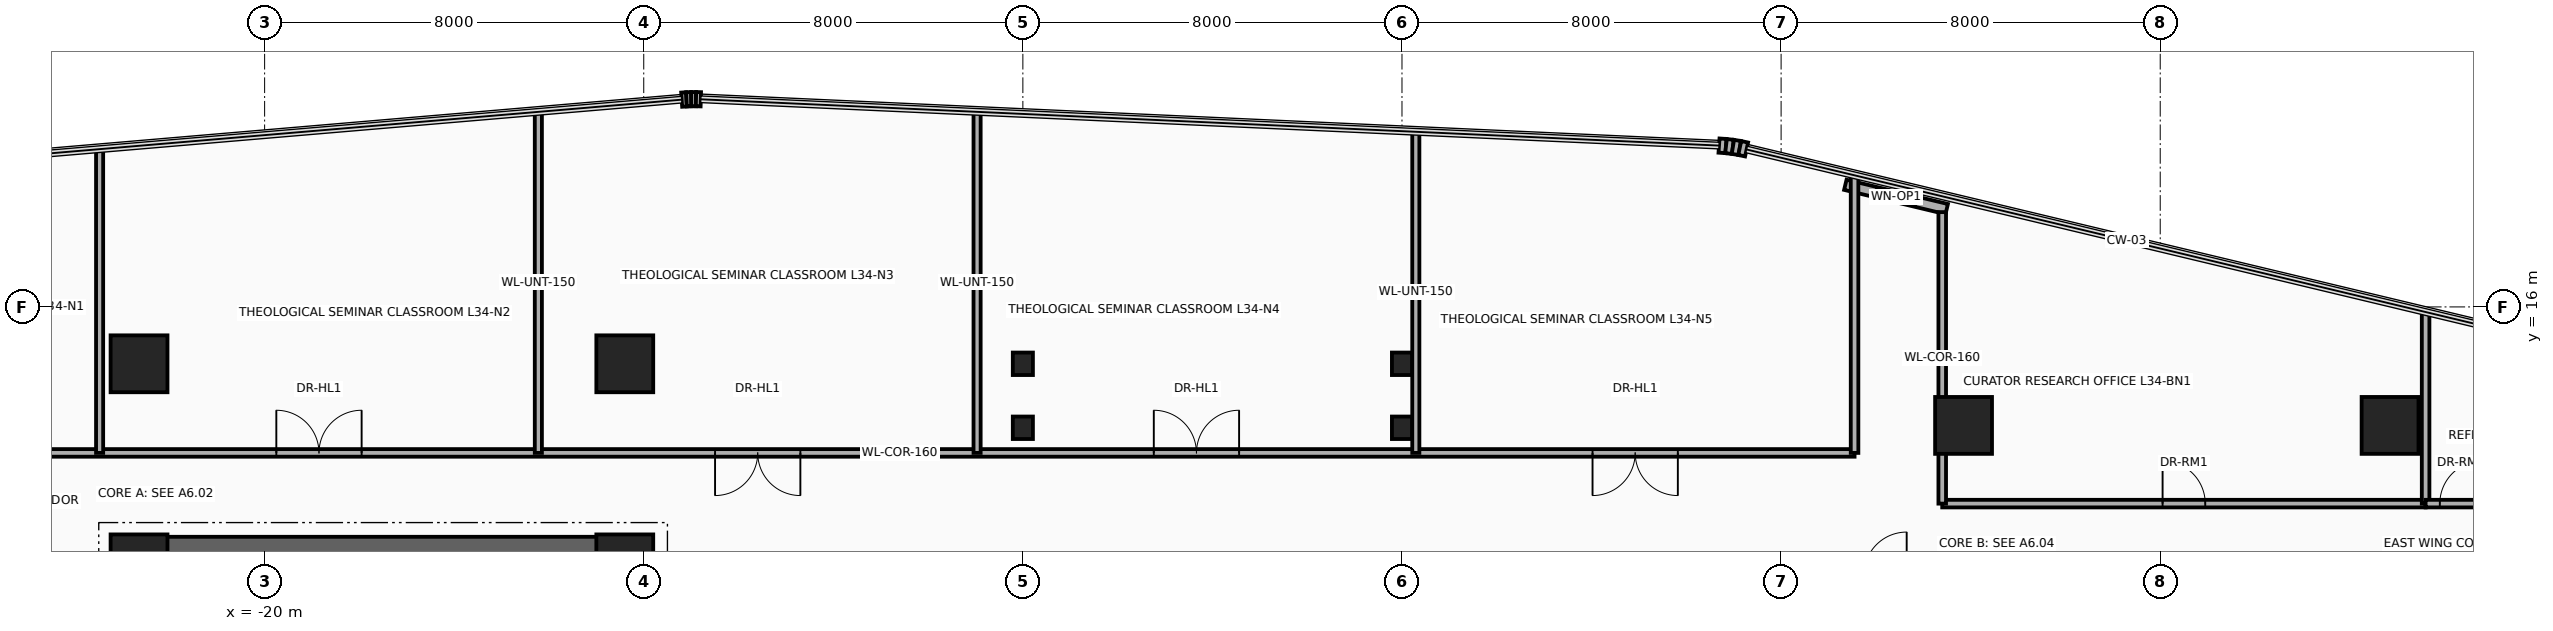
"""IFC4 building model, lengths in metres.
Left out: names, types, materials, properties, quantities, classifications, styles, units other than length and angle.
Written with IfcOpenShell. Run it as: python <this file> out.ifc"""

import sys

from ifc_helpers import new_model, si_unit, direction, frame, frame_2d, origin, origin_2d, place, context, subcontext, project, spatial, rectangle, i_section, extrude, source, transform, mapped, element, fill, save


model = new_model("IFC4")
c1 = context("Model", 3, precision=1e-05, world=origin(), true_north=direction((0.0, 1.0)))
c2 = subcontext(c1, "Body", "Model", "MODEL_VIEW")
j1 = project(units=[si_unit("LENGTHUNIT", "METRE"), si_unit("PLANEANGLEUNIT", "RADIAN")], contexts=[c1])
p1 = place(None, origin())
s1 = spatial("IfcSite", under=j1, at=p1, CompositionType="ELEMENT")
p2 = place(p1, origin())
s2 = spatial("IfcBuilding", under=s1, at=p2, CompositionType="ELEMENT")
p3 = place(p2, frame((0.0, 0.0, 135.3)))
s3 = spatial("IfcBuildingStorey", under=s2, at=p3, CompositionType="ELEMENT", Elevation=135.3)
p4 = place(p3, frame((-22.65, -11.15, 0.0), z_axis=(0.0, 0.0, 1.0), x_axis=(0.0, 1.0, 0.0)))
e1 = element("IfcWall", 1, at=p4, inside=s3, PredefinedType="SHEAR", context=c2, shape_type="SweptSolid", body=[
    extrude(rectangle(XDim=22.3, YDim=0.7, at=frame_2d((11.15, 0.0))), origin(), (0.0, 0.0, 1.0), 3.46),
])
p5 = place(p3, frame((-22.65, 10.8, 0.0), z_axis=(0.0, 0.0, 1.0), x_axis=(1.0, 0.0, 0.0)))
e2 = element("IfcWall", 2, at=p5, inside=s3, PredefinedType="SHEAR", context=c2, shape_type="SweptSolid", body=[
    extrude(rectangle(XDim=10.25, YDim=0.7, at=frame_2d((5.125, 0.0))), origin(), (0.0, 0.0, 1.0), 3.46),
])
m1 = source(origin(), c2, "Body", "SweptSolid", [
    extrude(rectangle(XDim=1.2, YDim=1.2, at=origin_2d()), origin(), (0.0, 0.0, 1.0), 3.7),
])
for number, where, z_axis, x_axis in (
    (3, (-22.65, 10.6, 0.0), (0.0, 0.0, 1.0), (1.0, 0.0, 0.0)),
    (4, (-12.4, 10.6, 0.0), (0.0, 0.0, 1.0), (1.0, 0.0, 0.0)),
    (5, (-22.65, 14.8, 0.0), (0.0, 0.0, 1.0), (1.0, 0.0, 0.0)),
    (6, (-12.4, 14.8, 0.0), (0.0, 0.0, 1.0), (1.0, 0.0, 0.0)),
    (7, (15.85, 13.5, 0.0), (0.0, 0.0, 1.0), (1.0, 0.0, 0.0)),
    (8, (24.85, 13.5, 0.0), (0.0, 0.0, 1.0), (1.0, 0.0, 0.0)),
):
    element("IfcColumn", number, at=place(p3, frame(where, z_axis=z_axis, x_axis=x_axis)), inside=s3, PredefinedType="COLUMN", context=c2, shape_type="MappedRepresentation", body=[
        mapped(m1, transform((0.0, 0.0, 0.0), x_axis=(1.0, 0.0, 0.0), y_axis=(0.0, 1.0, 0.0), z_axis=(0.0, 0.0, 1.0), scale=1.0)),
    ])
m2 = source(origin(), c2, "Body", "SweptSolid", [
    extrude(i_section(OverallWidth=0.424, OverallDepth=0.474, WebThickness=0.048, FlangeThickness=0.077, at=origin_2d()), origin(), (0.0, 0.0, 1.0), 3.7),
])
for number, where, z_axis, x_axis in (
    (9, (-4.0, 13.45, 0.0), (0.0, 0.0, 1.0), (1.0, 0.0, 0.0)),
    (10, (-4.0, 14.8, 0.0), (0.0, 0.0, 1.0), (1.0, 0.0, 0.0)),
    (11, (4.0, 13.45, 0.0), (0.0, 0.0, 1.0), (1.0, 0.0, 0.0)),
    (12, (4.0, 14.8, 0.0), (0.0, 0.0, 1.0), (1.0, 0.0, 0.0)),
):
    element("IfcColumn", number, at=place(p3, frame(where, z_axis=z_axis, x_axis=x_axis)), inside=s3, PredefinedType="COLUMN", context=c2, shape_type="MappedRepresentation", body=[
        mapped(m2, transform((0.0, 0.0, 0.0), x_axis=(1.0, 0.0, 0.0), y_axis=(0.0, 1.0, 0.0), z_axis=(0.0, 0.0, 1.0), scale=1.0)),
    ])
p6 = place(p3, frame((-11.199, 20.373, 0.0), z_axis=(0.0, 0.0, 1.0), x_axis=(0.997567332166, 0.069709524416, 0.0)))
e13 = element("IfcWall", 13, at=p6, inside=s3, PredefinedType="SOLIDWALL", context=c2, shape_type="SweptSolid", body=[
    extrude(rectangle(XDim=0.102, YDim=0.3, at=frame_2d((0.051, 0.0))), origin(), (0.0, 0.0, 1.0), 3.46),
])
p7 = place(p3, frame((-11.098, 20.38, 0.0), z_axis=(0.0, 0.0, 1.0), x_axis=(0.999334672785, 0.03647206835, 0.0)))
e14 = element("IfcWall", 14, at=p7, inside=s3, PredefinedType="SOLIDWALL", context=c2, shape_type="SweptSolid", body=[
    extrude(rectangle(XDim=0.1, YDim=0.3, at=frame_2d((0.05, 0.0))), origin(), (0.0, 0.0, 1.0), 3.46),
])
p8 = place(p3, frame((-10.998, 20.383, 0.0), z_axis=(0.0, 0.0, 1.0), x_axis=(0.999997054401, 0.002427177317, 0.0)))
e15 = element("IfcWall", 15, at=p8, inside=s3, PredefinedType="SOLIDWALL", context=c2, shape_type="SweptSolid", body=[
    extrude(rectangle(XDim=0.101, YDim=0.3, at=frame_2d((0.05, 0.0))), origin(), (0.0, 0.0, 1.0), 3.46),
])
p9 = place(p3, frame((-10.897, 20.384, 0.0), z_axis=(0.0, 0.0, 1.0), x_axis=(0.999584209171, -0.02883415988, 0.0)))
e16 = element("IfcWall", 16, at=p9, inside=s3, PredefinedType="SOLIDWALL", context=c2, shape_type="SweptSolid", body=[
    extrude(rectangle(XDim=0.102, YDim=0.3, at=frame_2d((0.051, 0.0))), origin(), (0.0, 0.0, 1.0), 3.46),
])
p10 = place(p3, frame((10.69, 19.404, 0.0), z_axis=(0.0, 0.0, 1.0), x_axis=(0.99758310784, -0.069483400546, 0.0)))
e17 = element("IfcWall", 17, at=p10, inside=s3, PredefinedType="SOLIDWALL", context=c2, shape_type="SweptSolid", body=[
    extrude(rectangle(XDim=0.147, YDim=0.3, at=frame_2d((0.074, 0.0))), origin(), (0.0, 0.0, 1.0), 3.46),
])
for number, where, z_axis, x_axis in (
    (18, (10.837, 19.394, 0.0), (0.0, 0.0, 1.0), (0.993, -0.117, 0.0)),
    (19, (10.983, 19.377, 0.0), (0.0, 0.0, 1.0), (0.987, -0.163, 0.0)),
):
    element("IfcWall", number, at=place(p3, frame(where, z_axis=z_axis, x_axis=x_axis)), inside=s3, PredefinedType="SOLIDWALL", context=c2, shape_type="SweptSolid", body=[
        extrude(rectangle(XDim=0.146, YDim=0.3, at=frame_2d((0.073, 0.0))), origin(), (0.0, 0.0, 1.0), 3.46),
    ])
p11 = place(p3, frame((11.127, 19.353, 0.0), z_axis=(0.0, 0.0, 1.0), x_axis=(0.978019841688, -0.208511844421, 0.0)))
e20 = element("IfcWall", 20, at=p11, inside=s3, PredefinedType="SOLIDWALL", context=c2, shape_type="SweptSolid", body=[
    extrude(rectangle(XDim=0.147, YDim=0.3, at=frame_2d((0.074, 0.0))), origin(), (0.0, 0.0, 1.0), 3.46),
])
p12 = place(p3, frame((13.355, 18.576, 0.0), z_axis=(0.0, 0.0, 1.0), x_axis=(0.97252211384, -0.232810519721, 0.0)))
e21 = element("IfcWall", 21, at=p12, inside=s3, PredefinedType="SOLIDWALL", context=c2, shape_type="SweptSolid", body=[
    extrude(rectangle(XDim=2.2, YDim=0.22, at=frame_2d((1.1, 0.0))), origin(), (0.0, 0.0, 1.0), 3.46),
])
p13 = place(p12, frame((0.65, 0.0, 0.95)))
e22 = element("IfcOpeningElement", 22, at=p13, cuts=e21, PredefinedType="OPENING", context=c2, shape_type="SweptSolid", body=[
    extrude(rectangle(XDim=0.9, YDim=1.3, at=frame_2d((0.45, 0.65))), frame((0.0, 0.125, 0.0), z_axis=(0.0, -1.0, 0.0), x_axis=(1.0, 0.0, 0.0)), (0.0, 0.0, 1.0), 0.25),
])
p14 = place(p3, frame((-28.25, 12.92, 0.0), z_axis=(0.0, 0.0, 1.0), x_axis=(1.0, 0.0, 0.0)))
e23 = element("IfcWall", 23, at=p14, inside=s3, PredefinedType="PARTITIONING", context=c2, shape_type="SweptSolid", body=[
    extrude(rectangle(XDim=41.8, YDim=0.16, at=frame_2d((20.9, 0.0))), origin(), (0.0, 0.0, 1.0), 2.666),
])
p15 = place(p14, frame((1.934, 0.0, 0.0)))
e24 = element("IfcOpeningElement", 24, at=p15, cuts=e23, PredefinedType="OPENING", context=c2, shape_type="SweptSolid", body=[
    extrude(rectangle(XDim=0.9, YDim=2.1, at=frame_2d((0.45, 1.05))), frame((0.0, 0.095, 0.0), z_axis=(0.0, -1.0, 0.0), x_axis=(1.0, 0.0, 0.0)), (0.0, 0.0, 1.0), 0.19),
])
p16 = place(p14, frame((8.497, 0.0, 0.0)))
e25 = element("IfcOpeningElement", 25, at=p16, cuts=e23, PredefinedType="OPENING", context=c2, shape_type="SweptSolid", body=[
    extrude(rectangle(XDim=1.8, YDim=2.15, at=frame_2d((0.9, 1.075))), frame((0.0, 0.095, 0.0), z_axis=(0.0, -1.0, 0.0), x_axis=(1.0, 0.0, 0.0)), (0.0, 0.0, 1.0), 0.19),
])
p17 = place(p14, frame((17.755, 0.0, 0.0)))
e26 = element("IfcOpeningElement", 26, at=p17, cuts=e23, PredefinedType="OPENING", context=c2, shape_type="SweptSolid", body=[
    extrude(rectangle(XDim=1.8, YDim=2.15, at=frame_2d((0.9, 1.075))), frame((0.0, 0.095, 0.0), z_axis=(0.0, -1.0, 0.0), x_axis=(1.0, 0.0, 0.0)), (0.0, 0.0, 1.0), 0.19),
])
p18 = place(p14, frame((27.013, 0.0, 0.0)))
e27 = element("IfcOpeningElement", 27, at=p18, cuts=e23, PredefinedType="OPENING", context=c2, shape_type="SweptSolid", body=[
    extrude(rectangle(XDim=1.8, YDim=2.15, at=frame_2d((0.9, 1.075))), frame((0.0, 0.095, 0.0), z_axis=(0.0, -1.0, 0.0), x_axis=(1.0, 0.0, 0.0)), (0.0, 0.0, 1.0), 0.19),
])
p19 = place(p14, frame((36.271, 0.0, 0.0)))
e28 = element("IfcOpeningElement", 28, at=p19, cuts=e23, PredefinedType="OPENING", context=c2, shape_type="SweptSolid", body=[
    extrude(rectangle(XDim=1.8, YDim=2.15, at=frame_2d((0.9, 1.075))), frame((0.0, 0.095, 0.0), z_axis=(0.0, -1.0, 0.0), x_axis=(1.0, 0.0, 0.0)), (0.0, 0.0, 1.0), 0.19),
])
p20 = place(p3, frame((13.55, 12.92, 0.0), z_axis=(0.0, 0.0, 1.0), x_axis=(0.0, 1.0, 0.0)))
e29 = element("IfcWall", 29, at=p20, inside=s3, PredefinedType="PARTITIONING", context=c2, shape_type="SweptSolid", body=[
    extrude(rectangle(XDim=5.857, YDim=0.16, at=frame_2d((2.928, 0.0))), origin(), (0.0, 0.0, 1.0), 2.666),
])
p21 = place(p3, frame((-23.482, 12.92, 0.0), z_axis=(0.0, 0.0, 1.0), x_axis=(0.0, 1.0, 0.0)))
e30 = element("IfcWall", 30, at=p21, inside=s3, PredefinedType="PARTITIONING", context=c2, shape_type="SweptSolid", body=[
    extrude(rectangle(XDim=6.409, YDim=0.15, at=frame_2d((3.204, 0.0))), origin(), (0.0, 0.0, 1.0), 2.666),
])
for number, where, z_axis, x_axis in (
    (31, (-14.224, 12.92, 0.0), (0.0, 0.0, 1.0), (0.0, 1.0, 0.0)),
    (32, (-4.966, 12.92, 0.0), (0.0, 0.0, 1.0), (0.0, 1.0, 0.0)),
):
    element("IfcWall", number, at=place(p3, frame(where, z_axis=z_axis, x_axis=x_axis)), inside=s3, PredefinedType="PARTITIONING", context=c2, shape_type="SweptSolid", body=[
        extrude(rectangle(XDim=7.196, YDim=0.15, at=frame_2d((3.598, 0.0))), origin(), (0.0, 0.0, 1.0), 2.666),
    ])
p22 = place(p3, frame((4.292, 12.92, 0.0), z_axis=(0.0, 0.0, 1.0), x_axis=(0.0, 1.0, 0.0)))
e33 = element("IfcWall", 33, at=p22, inside=s3, PredefinedType="PARTITIONING", context=c2, shape_type="SweptSolid", body=[
    extrude(rectangle(XDim=6.775, YDim=0.15, at=frame_2d((3.387, 0.0))), origin(), (0.0, 0.0, 1.0), 2.666),
])
p23 = place(p3, frame((15.4, 11.85, 0.0), z_axis=(0.0, 0.0, 1.0), x_axis=(1.0, 0.0, 0.0)))
e34 = element("IfcWall", 34, at=p23, inside=s3, PredefinedType="PARTITIONING", context=c2, shape_type="SweptSolid", body=[
    extrude(rectangle(XDim=10.2, YDim=0.16, at=frame_2d((5.1, 0.0))), origin(), (0.0, 0.0, 1.0), 2.834),
])
p24 = place(p23, frame((4.65, 0.0, 0.0)))
e35 = element("IfcOpeningElement", 35, at=p24, cuts=e34, PredefinedType="OPENING", context=c2, shape_type="SweptSolid", body=[
    extrude(rectangle(XDim=0.9, YDim=2.1, at=frame_2d((0.45, 1.05))), frame((0.0, 0.095, 0.0), z_axis=(0.0, -1.0, 0.0), x_axis=(1.0, 0.0, 0.0)), (0.0, 0.0, 1.0), 0.19),
])
p25 = place(p3, frame((15.4, 11.85, 0.0), z_axis=(0.0, 0.0, 1.0), x_axis=(0.0, 1.0, 0.0)))
e36 = element("IfcWall", 36, at=p25, inside=s3, PredefinedType="PARTITIONING", context=c2, shape_type="SweptSolid", body=[
    extrude(rectangle(XDim=6.15, YDim=0.16, at=frame_2d((3.075, 0.0))), origin(), (0.0, 0.0, 1.0), 2.666),
])
p26 = place(p3, frame((25.6, 11.85, 0.0), z_axis=(0.0, 0.0, 1.0), x_axis=(0.0, 1.0, 0.0)))
e37 = element("IfcWall", 37, at=p26, inside=s3, PredefinedType="PARTITIONING", context=c2, shape_type="SweptSolid", body=[
    extrude(rectangle(XDim=4.042, YDim=0.16, at=frame_2d((2.021, 0.0))), origin(), (0.0, 0.0, 1.0), 2.666),
])
p27 = place(p3, frame((25.6, 11.85, 0.0), z_axis=(0.0, 0.0, 1.0), x_axis=(1.0, 0.0, 0.0)))
e38 = element("IfcWall", 38, at=p27, inside=s3, PredefinedType="PARTITIONING", context=c2, shape_type="SweptSolid", body=[
    extrude(rectangle(XDim=4.09, YDim=0.16, at=frame_2d((2.045, 0.0))), origin(), (0.0, 0.0, 1.0), 2.896),
])
p28 = place(p27, frame((0.3, 0.0, 0.0)))
e39 = element("IfcOpeningElement", 39, at=p28, cuts=e38, PredefinedType="OPENING", context=c2, shape_type="SweptSolid", body=[
    extrude(rectangle(XDim=0.9, YDim=2.1, at=frame_2d((0.45, 1.05))), frame((0.0, 0.095, 0.0), z_axis=(0.0, -1.0, 0.0), x_axis=(1.0, 0.0, 0.0)), (0.0, 0.0, 1.0), 0.19),
])
p29 = place(p13, origin())
e40 = element("IfcWindow", 40, at=p29, inside=s3, PartitioningType="SINGLE_PANEL", PredefinedType="WINDOW", context=c2, shape_type="SweptSolid", body=[
    extrude(rectangle(XDim=0.9, YDim=1.3, at=frame_2d((0.45, 0.65))), frame((0.0, 0.03, 0.0), z_axis=(0.0, -1.0, 0.0), x_axis=(1.0, 0.0, 0.0)), (0.0, 0.0, 1.0), 0.06),
])
fill(e22, e40)
p30 = place(p16, origin())
e41 = element("IfcDoor", 41, at=p30, inside=s3, OperationType="DOUBLE_DOOR_SINGLE_SWING", PredefinedType="DOOR", context=c2, shape_type="SweptSolid", body=[
    extrude(rectangle(XDim=1.8, YDim=2.15, at=frame_2d((0.9, 1.075))), frame((0.0, 0.025, 0.0), z_axis=(0.0, -1.0, 0.0), x_axis=(1.0, 0.0, 0.0)), (0.0, 0.0, 1.0), 0.05),
])
fill(e25, e41)
p31 = place(p17, frame((1.8, 0.0, 0.0), z_axis=(0.0, 0.0, 1.0), x_axis=(-1.0, 0.0, 0.0)))
e42 = element("IfcDoor", 42, at=p31, inside=s3, OperationType="DOUBLE_DOOR_SINGLE_SWING", PredefinedType="DOOR", context=c2, shape_type="SweptSolid", body=[
    extrude(rectangle(XDim=1.8, YDim=2.15, at=frame_2d((0.9, 1.075))), frame((0.0, 0.025, 0.0), z_axis=(0.0, -1.0, 0.0), x_axis=(1.0, 0.0, 0.0)), (0.0, 0.0, 1.0), 0.05),
])
fill(e26, e42)
p32 = place(p18, origin())
e43 = element("IfcDoor", 43, at=p32, inside=s3, OperationType="DOUBLE_DOOR_SINGLE_SWING", PredefinedType="DOOR", context=c2, shape_type="SweptSolid", body=[
    extrude(rectangle(XDim=1.8, YDim=2.15, at=frame_2d((0.9, 1.075))), frame((0.0, 0.025, 0.0), z_axis=(0.0, -1.0, 0.0), x_axis=(1.0, 0.0, 0.0)), (0.0, 0.0, 1.0), 0.05),
])
fill(e27, e43)
p33 = place(p19, frame((1.8, 0.0, 0.0), z_axis=(0.0, 0.0, 1.0), x_axis=(-1.0, 0.0, 0.0)))
e44 = element("IfcDoor", 44, at=p33, inside=s3, OperationType="DOUBLE_DOOR_SINGLE_SWING", PredefinedType="DOOR", context=c2, shape_type="SweptSolid", body=[
    extrude(rectangle(XDim=1.8, YDim=2.15, at=frame_2d((0.9, 1.075))), frame((0.0, 0.025, 0.0), z_axis=(0.0, -1.0, 0.0), x_axis=(1.0, 0.0, 0.0)), (0.0, 0.0, 1.0), 0.05),
])
fill(e28, e44)
p34 = place(p24, origin())
e45 = element("IfcDoor", 45, at=p34, inside=s3, OperationType="SINGLE_SWING_RIGHT", PredefinedType="DOOR", context=c2, shape_type="SweptSolid", body=[
    extrude(rectangle(XDim=0.9, YDim=2.1, at=frame_2d((0.45, 1.05))), frame((0.0, 0.025, 0.0), z_axis=(0.0, -1.0, 0.0), x_axis=(1.0, 0.0, 0.0)), (0.0, 0.0, 1.0), 0.05),
])
fill(e35, e45)
p35 = place(p28, origin())
e46 = element("IfcDoor", 46, at=p35, inside=s3, OperationType="SINGLE_SWING_RIGHT", PredefinedType="DOOR", context=c2, shape_type="SweptSolid", body=[
    extrude(rectangle(XDim=0.9, YDim=2.1, at=frame_2d((0.45, 1.05))), frame((0.0, 0.025, 0.0), z_axis=(0.0, -1.0, 0.0), x_axis=(1.0, 0.0, 0.0)), (0.0, 0.0, 1.0), 0.05),
])
fill(e39, e46)
save(model, sys.argv[1])
